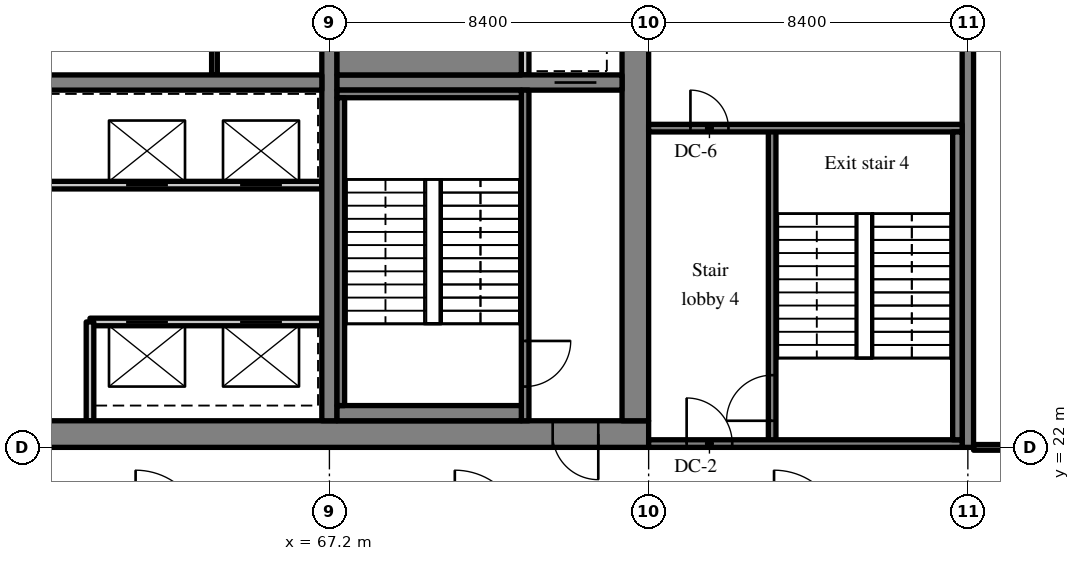
"""IFC4 building model, lengths in metres.
Left out: names, types, materials, properties, quantities, classifications, styles, units other than length and angle.
Written with IfcOpenShell. Run it as: python <this file> out.ifc"""

import sys

from ifc_helpers import new_model, si_unit, direction, frame, frame_2d, origin, place, context, subcontext, project, spatial, rectangle, extrude, source, transform, mapped, element, fill, save


model = new_model("IFC4")
c1 = context("Model", 3, precision=1e-05, world=origin(), true_north=direction((0.0, 1.0)))
c2 = subcontext(c1, "Body", "Model", "MODEL_VIEW")
j1 = project(units=[si_unit("LENGTHUNIT", "METRE"), si_unit("PLANEANGLEUNIT", "RADIAN")], contexts=[c1])
p1 = place(None, origin())
s1 = spatial("IfcSite", under=j1, at=p1, CompositionType="ELEMENT")
p2 = place(p1, origin())
s2 = spatial("IfcBuilding", under=s1, at=p2, CompositionType="ELEMENT")
p3 = place(p2, frame((0.0, 0.0, 146.2)))
s3 = spatial("IfcBuildingStorey", under=s2, at=p3, CompositionType="ELEMENT", Elevation=146.2)
m1 = source(origin(), c2, "Body", "SweptSolid", [
    extrude(rectangle(XDim=50.4, YDim=0.7, at=frame_2d((25.2, 0.0))), origin(), (0.0, 0.0, 1.0), 5.12),
])
p4 = place(p3, frame((25.2, 22.35, 0.0), z_axis=(0.0, 0.0, 1.0), x_axis=(1.0, 0.0, 0.0)))
e1 = element("IfcWall", 1, at=p4, inside=s3, PredefinedType="SHEAR", context=c2, shape_type="MappedRepresentation", body=[
    mapped(m1, transform((0.0, 0.0, 0.0), scale=1.0)),
])
m2 = source(origin(), c2, "Body", "SweptSolid", [
    extrude(rectangle(XDim=1.8, YDim=2.1, at=frame_2d((0.9, 1.05))), frame((0.0, 0.36, 0.0), z_axis=(0.0, -1.0, 0.0), x_axis=(1.0, 0.0, 0.0)), (0.0, 0.0, 1.0), 0.72),
])
p5 = place(p4, frame((15.9, 0.0, 0.0)))
e2 = element("IfcOpeningElement", 2, at=p5, cuts=e1, PredefinedType="OPENING", context=c2, shape_type="MappedRepresentation", body=[
    mapped(m2, transform((0.0, 0.0, 0.0), scale=1.0)),
])
p6 = place(p4, frame((32.7, 0.0, 0.0)))
e3 = element("IfcOpeningElement", 3, at=p6, cuts=e1, PredefinedType="OPENING", context=c2, shape_type="MappedRepresentation", body=[
    mapped(m2, transform((0.0, 0.0, 0.0), scale=1.0)),
])
m3 = source(origin(), c2, "Body", "SweptSolid", [
    extrude(rectangle(XDim=1.2, YDim=2.1, at=frame_2d((0.6, 1.05))), frame((0.0, 0.36, 0.0), z_axis=(0.0, -1.0, 0.0), x_axis=(1.0, 0.0, 0.0)), (0.0, 0.0, 1.0), 0.72),
])
p7 = place(p4, frame((6.475, 0.0, 0.0)))
e4 = element("IfcOpeningElement", 4, at=p7, cuts=e1, PredefinedType="OPENING", context=c2, shape_type="MappedRepresentation", body=[
    mapped(m3, transform((0.0, 0.0, 0.0), scale=1.0)),
])
p8 = place(p4, frame((47.875, 0.0, 0.0)))
e5 = element("IfcOpeningElement", 5, at=p8, cuts=e1, PredefinedType="OPENING", context=c2, shape_type="MappedRepresentation", body=[
    mapped(m3, transform((0.0, 0.0, 0.0), scale=1.0)),
])
m4 = source(origin(), c2, "Body", "SweptSolid", [
    extrude(rectangle(XDim=18.6, YDim=0.7, at=frame_2d((9.3, 0.0))), origin(), (0.0, 0.0, 1.0), 5.12),
])
p9 = place(p3, frame((75.25, 22.7, 0.0), z_axis=(0.0, 0.0, 1.0), x_axis=(0.0, 1.0, 0.0)))
e6 = element("IfcWall", 6, at=p9, inside=s3, PredefinedType="SHEAR", context=c2, shape_type="MappedRepresentation", body=[
    mapped(m4, transform((0.0, 0.0, 0.0), scale=1.0)),
])
p10 = place(p9, frame((12.7, 0.0, 0.0)))
e7 = element("IfcOpeningElement", 7, at=p10, cuts=e6, PredefinedType="OPENING", context=c2, shape_type="MappedRepresentation", body=[
    mapped(m3, transform((0.0, 0.0, 0.0), scale=1.0)),
])
m5 = source(origin(), c2, "Body", "SweptSolid", [
    extrude(rectangle(XDim=18.6, YDim=0.4, at=frame_2d((9.3, 0.0))), origin(), (0.0, 0.0, 1.0), 5.12),
])
p11 = place(p3, frame((67.2, 22.7, 0.0), z_axis=(0.0, 0.0, 1.0), x_axis=(0.0, 1.0, 0.0)))
e8 = element("IfcWall", 8, at=p11, inside=s3, PredefinedType="SHEAR", context=c2, shape_type="MappedRepresentation", body=[
    mapped(m5, transform((0.0, 0.0, 0.0), scale=1.0)),
])
m6 = source(origin(), c2, "Body", "SweptSolid", [
    extrude(rectangle(XDim=16.4, YDim=0.4, at=frame_2d((8.2, 0.0))), origin(), (0.0, 0.0, 1.0), 5.12),
])
p12 = place(p3, frame((50.6, 31.6, 0.0), z_axis=(0.0, 0.0, 1.0), x_axis=(1.0, 0.0, 0.0)))
e9 = element("IfcWall", 9, at=p12, inside=s3, PredefinedType="SHEAR", context=c2, shape_type="MappedRepresentation", body=[
    mapped(m6, transform((0.0, 0.0, 0.0), scale=1.0)),
])
m7 = source(origin(), c2, "Body", "SweptSolid", [
    extrude(rectangle(XDim=1.0, YDim=2.1, at=frame_2d((0.5, 1.05))), frame((0.0, 0.21, 0.0), z_axis=(0.0, -1.0, 0.0), x_axis=(1.0, 0.0, 0.0)), (0.0, 0.0, 1.0), 0.42),
])
p13 = place(p12, frame((0.6, 0.0, 0.0)))
e10 = element("IfcOpeningElement", 10, at=p13, cuts=e9, PredefinedType="OPENING", context=c2, shape_type="MappedRepresentation", body=[
    mapped(m7, transform((0.0, 0.0, 0.0), scale=1.0)),
])
m8 = source(origin(), c2, "Body", "SweptSolid", [
    extrude(rectangle(XDim=7.5, YDim=0.4, at=frame_2d((3.75, 0.0))), origin(), (0.0, 0.0, 1.0), 5.12),
])
p14 = place(p3, frame((67.4, 31.6, 0.0), z_axis=(0.0, 0.0, 1.0), x_axis=(1.0, 0.0, 0.0)))
e11 = element("IfcWall", 11, at=p14, inside=s3, PredefinedType="SHEAR", context=c2, shape_type="MappedRepresentation", body=[
    mapped(m8, transform((0.0, 0.0, 0.0), scale=1.0)),
])
m9 = source(origin(), c2, "Body", "SweptSolid", [
    extrude(rectangle(XDim=1.1, YDim=2.1, at=frame_2d((0.55, 1.05))), frame((0.0, 0.21, 0.0), z_axis=(0.0, -1.0, 0.0), x_axis=(1.0, 0.0, 0.0)), (0.0, 0.0, 1.0), 0.42),
])
p15 = place(p14, frame((5.725, 0.0, 0.0)))
e12 = element("IfcOpeningElement", 12, at=p15, cuts=e11, PredefinedType="OPENING", context=c2, shape_type="MappedRepresentation", body=[
    mapped(m9, transform((0.0, 0.0, 0.0), scale=1.0)),
])
m10 = source(origin(), c2, "Body", "SweptSolid", [
    extrude(rectangle(XDim=20.0, YDim=0.3, at=frame_2d((10.0, 0.0))), origin(), (0.0, 0.0, 1.0), 5.12),
])
p16 = place(p3, frame((84.0, 22.0, 0.0), z_axis=(0.0, 0.0, 1.0), x_axis=(0.0, 1.0, 0.0)))
e13 = element("IfcWall", 13, at=p16, inside=s3, PredefinedType="SHEAR", context=c2, shape_type="MappedRepresentation", body=[
    mapped(m10, transform((0.0, 0.0, 0.0), scale=1.0)),
])
m11 = source(origin(), c2, "Body", "SweptSolid", [
    extrude(rectangle(XDim=6.1, YDim=0.2, at=frame_2d((3.05, 0.0))), origin(), (0.0, 0.0, 1.0), 5.12),
])
p17 = place(p3, frame((67.0, 25.3, 0.0), z_axis=(0.0, 0.0, 1.0), x_axis=(-1.0, 0.0, 0.0)))
e14 = element("IfcWall", 14, at=p17, inside=s3, PredefinedType="SOLIDWALL", context=c2, shape_type="MappedRepresentation", body=[
    mapped(m11, transform((0.0, 0.0, 0.0), scale=1.0)),
])
m12 = source(origin(), c2, "Body", "SweptSolid", [
    extrude(rectangle(XDim=1.1, YDim=2.1, at=frame_2d((0.55, 1.05))), frame((0.0, 0.11, 0.0), z_axis=(0.0, -1.0, 0.0), x_axis=(1.0, 0.0, 0.0)), (0.0, 0.0, 1.0), 0.22),
])
p18 = place(p17, frame((1.05, 0.0, 0.0)))
e15 = element("IfcOpeningElement", 15, at=p18, cuts=e14, PredefinedType="OPENING", context=c2, shape_type="MappedRepresentation", body=[
    mapped(m12, transform((0.0, 0.0, 0.0), scale=1.0)),
])
p19 = place(p17, frame((4.05, 0.0, 0.0)))
e16 = element("IfcOpeningElement", 16, at=p19, cuts=e14, PredefinedType="OPENING", context=c2, shape_type="MappedRepresentation", body=[
    mapped(m12, transform((0.0, 0.0, 0.0), scale=1.0)),
])
m13 = source(origin(), c2, "Body", "SweptSolid", [
    extrude(rectangle(XDim=12.1, YDim=0.2, at=frame_2d((6.05, 0.0))), origin(), (0.0, 0.0, 1.0), 5.12),
])
p20 = place(p3, frame((67.0, 28.9, 0.0), z_axis=(0.0, 0.0, 1.0), x_axis=(-1.0, 0.0, 0.0)))
e17 = element("IfcWall", 17, at=p20, inside=s3, PredefinedType="SOLIDWALL", context=c2, shape_type="MappedRepresentation", body=[
    mapped(m13, transform((0.0, 0.0, 0.0), scale=1.0)),
])
p21 = place(p20, frame((1.05, 0.0, 0.0)))
e18 = element("IfcOpeningElement", 18, at=p21, cuts=e17, PredefinedType="OPENING", context=c2, shape_type="MappedRepresentation", body=[
    mapped(m12, transform((0.0, 0.0, 0.0), scale=1.0)),
])
p22 = place(p20, frame((4.05, 0.0, 0.0)))
e19 = element("IfcOpeningElement", 19, at=p22, cuts=e17, PredefinedType="OPENING", context=c2, shape_type="MappedRepresentation", body=[
    mapped(m12, transform((0.0, 0.0, 0.0), scale=1.0)),
])
m14 = source(origin(), c2, "Body", "SweptSolid", [
    extrude(rectangle(XDim=2.6, YDim=0.2, at=frame_2d((1.3, 0.0))), origin(), (0.0, 0.0, 1.0), 5.12),
])
p23 = place(p3, frame((60.9, 22.7, 0.0), z_axis=(0.0, 0.0, 1.0), x_axis=(0.0, 1.0, 0.0)))
e20 = element("IfcWall", 20, at=p23, inside=s3, PredefinedType="SOLIDWALL", context=c2, shape_type="MappedRepresentation", body=[
    mapped(m14, transform((0.0, 0.0, 0.0), scale=1.0)),
])
m15 = source(origin(), c2, "Body", "SweptSolid", [
    extrude(rectangle(XDim=3.2, YDim=0.15, at=frame_2d((1.6, 0.0))), origin(), (0.0, 0.0, 1.0), 5.12),
])
p24 = place(p3, frame((64.175, 31.8, 0.0), z_axis=(0.0, 0.0, 1.0), x_axis=(0.0, 1.0, 0.0)))
e21 = element("IfcWall", 21, at=p24, inside=s3, PredefinedType="PARTITIONING", context=c2, shape_type="MappedRepresentation", body=[
    mapped(m15, transform((0.0, 0.0, 0.0), scale=1.0)),
])
m16 = source(origin(), c2, "Body", "SweptSolid", [
    extrude(rectangle(XDim=8.7, YDim=0.2, at=frame_2d((4.35, 0.0))), origin(), (0.0, 0.0, 1.0), 5.12),
])
p25 = place(p3, frame((72.35, 22.7, 0.0), z_axis=(0.0, 0.0, 1.0), x_axis=(0.0, 1.0, 0.0)))
e22 = element("IfcWall", 22, at=p25, inside=s3, PredefinedType="SOLIDWALL", context=c2, shape_type="MappedRepresentation", body=[
    mapped(m16, transform((0.0, 0.0, 0.0), scale=1.0)),
])
m17 = source(origin(), c2, "Body", "SweptSolid", [
    extrude(rectangle(XDim=1.2, YDim=2.1, at=frame_2d((0.6, 1.05))), frame((0.0, 0.11, 0.0), z_axis=(0.0, -1.0, 0.0), x_axis=(1.0, 0.0, 0.0)), (0.0, 0.0, 1.0), 0.22),
])
p26 = place(p25, frame((0.9, 0.0, 0.0)))
e23 = element("IfcOpeningElement", 23, at=p26, cuts=e22, PredefinedType="OPENING", context=c2, shape_type="MappedRepresentation", body=[
    mapped(m17, transform((0.0, 0.0, 0.0), scale=1.0)),
])
m18 = source(origin(), c2, "Body", "SweptSolid", [
    extrude(rectangle(XDim=1.8, YDim=0.2, at=frame_2d((0.9, 0.0))), origin(), (0.0, 0.0, 1.0), 5.12),
])
p27 = place(p3, frame((72.35, 31.8, 0.0), z_axis=(0.0, 0.0, 1.0), x_axis=(0.0, 1.0, 0.0)))
e24 = element("IfcWall", 24, at=p27, inside=s3, PredefinedType="SOLIDWALL", context=c2, shape_type="MappedRepresentation", body=[
    mapped(m18, transform((0.0, 0.0, 0.0), scale=1.0)),
])
m19 = source(origin(), c2, "Body", "SweptSolid", [
    extrude(rectangle(XDim=8.3, YDim=0.2, at=frame_2d((4.15, 0.0))), origin(), (0.0, 0.0, 1.0), 5.12),
])
p28 = place(p3, frame((78.85, 22.1, 0.0), z_axis=(0.0, 0.0, 1.0), x_axis=(0.0, 1.0, 0.0)))
e25 = element("IfcWall", 25, at=p28, inside=s3, PredefinedType="SOLIDWALL", context=c2, shape_type="MappedRepresentation", body=[
    mapped(m19, transform((0.0, 0.0, 0.0), scale=1.0)),
])
p29 = place(p28, frame((0.6, 0.0, 0.0)))
e26 = element("IfcOpeningElement", 26, at=p29, cuts=e25, PredefinedType="OPENING", context=c2, shape_type="MappedRepresentation", body=[
    mapped(m17, transform((0.0, 0.0, 0.0), scale=1.0)),
])
m20 = source(origin(), c2, "Body", "SweptSolid", [
    extrude(rectangle(XDim=8.25, YDim=0.2, at=frame_2d((4.125, 0.0))), origin(), (0.0, 0.0, 1.0), 5.12),
])
p30 = place(p3, frame((83.85, 22.1, 0.0), z_axis=(0.0, 0.0, 1.0), x_axis=(-1.0, 0.0, 0.0)))
e27 = element("IfcWall", 27, at=p30, inside=s3, PredefinedType="SOLIDWALL", context=c2, shape_type="MappedRepresentation", body=[
    mapped(m20, transform((0.0, 0.0, 0.0), scale=1.0)),
])
p31 = place(p30, frame((6.05, 0.0, 0.0)))
e28 = element("IfcOpeningElement", 28, at=p31, cuts=e27, PredefinedType="OPENING", context=c2, shape_type="MappedRepresentation", body=[
    mapped(m17, transform((0.0, 0.0, 0.0), scale=1.0)),
])
p32 = place(p3, frame((83.85, 30.4, 0.0), z_axis=(0.0, 0.0, 1.0), x_axis=(-1.0, 0.0, 0.0)))
e29 = element("IfcWall", 29, at=p32, inside=s3, PredefinedType="SOLIDWALL", context=c2, shape_type="MappedRepresentation", body=[
    mapped(m20, transform((0.0, 0.0, 0.0), scale=1.0)),
])
m21 = source(origin(), c2, "Body", "SweptSolid", [
    extrude(rectangle(XDim=1.0, YDim=2.1, at=frame_2d((0.5, 1.05))), frame((0.0, 0.11, 0.0), z_axis=(0.0, -1.0, 0.0), x_axis=(1.0, 0.0, 0.0)), (0.0, 0.0, 1.0), 0.22),
])
p33 = place(p32, frame((6.15, 0.0, 0.0)))
e30 = element("IfcOpeningElement", 30, at=p33, cuts=e29, PredefinedType="OPENING", context=c2, shape_type="MappedRepresentation", body=[
    mapped(m21, transform((0.0, 0.0, 0.0), scale=1.0)),
])
m22 = source(origin(), c2, "Body", "SweptSolid", [
    extrude(rectangle(XDim=4.85, YDim=0.4, at=frame_2d((2.425, 0.0))), origin(), (0.0, 0.0, 1.0), 5.12),
])
p34 = place(p3, frame((67.4, 22.9, 0.0), z_axis=(0.0, 0.0, 1.0), x_axis=(1.0, 0.0, 0.0)))
e31 = element("IfcWall", 31, at=p34, inside=s3, PredefinedType="SOLIDWALL", context=c2, shape_type="MappedRepresentation", body=[
    mapped(m22, transform((0.0, 0.0, 0.0), scale=1.0)),
])
m23 = source(origin(), c2, "Body", "SweptSolid", [
    extrude(rectangle(XDim=4.85, YDim=0.2, at=frame_2d((2.425, 0.0))), origin(), (0.0, 0.0, 1.0), 5.12),
])
p35 = place(p3, frame((67.4, 31.3, 0.0), z_axis=(0.0, 0.0, 1.0), x_axis=(1.0, 0.0, 0.0)))
e32 = element("IfcWall", 32, at=p35, inside=s3, PredefinedType="SOLIDWALL", context=c2, shape_type="MappedRepresentation", body=[
    mapped(m23, transform((0.0, 0.0, 0.0), scale=1.0)),
])
m24 = source(origin(), c2, "Body", "SweptSolid", [
    extrude(rectangle(XDim=8.1, YDim=0.2, at=frame_2d((4.05, 0.0))), origin(), (0.0, 0.0, 1.0), 5.12),
])
p36 = place(p3, frame((67.5, 23.1, 0.0), z_axis=(0.0, 0.0, 1.0), x_axis=(0.0, 1.0, 0.0)))
e33 = element("IfcWall", 33, at=p36, inside=s3, PredefinedType="SOLIDWALL", context=c2, shape_type="MappedRepresentation", body=[
    mapped(m24, transform((0.0, 0.0, 0.0), scale=1.0)),
])
m25 = source(origin(), c2, "Body", "SweptSolid", [
    extrude(rectangle(XDim=4.85, YDim=1.0, at=frame_2d((2.425, 0.0))), origin(), (0.0, 0.0, 1.0), 5.12),
])
p37 = place(p3, frame((67.4, 32.3, 0.0), z_axis=(0.0, 0.0, 1.0), x_axis=(1.0, 0.0, 0.0)))
e34 = element("IfcWall", 34, at=p37, inside=s3, PredefinedType="SOLIDWALL", context=c2, shape_type="MappedRepresentation", body=[
    mapped(m25, transform((0.0, 0.0, 0.0), scale=1.0)),
])
m26 = source(origin(), c2, "Body", "SweptSolid", [
    extrude(rectangle(XDim=8.1, YDim=0.25, at=frame_2d((4.05, 0.0))), origin(), (0.0, 0.0, 1.0), 5.12),
])
p38 = place(p3, frame((83.725, 22.2, 0.0), z_axis=(0.0, 0.0, 1.0), x_axis=(0.0, 1.0, 0.0)))
e35 = element("IfcWall", 35, at=p38, inside=s3, PredefinedType="SOLIDWALL", context=c2, shape_type="MappedRepresentation", body=[
    mapped(m26, transform((0.0, 0.0, 0.0), scale=1.0)),
])
m27 = source(origin(), c2, "Body", "SweptSolid", [
    extrude(rectangle(XDim=7.95, YDim=0.15, at=frame_2d((3.975, 0.0))), origin(), (0.0, 0.0, 1.0), 4.42),
])
p39 = place(p3, frame((84.15, 22.0, 0.0), z_axis=(0.0, 0.0, 1.0), x_axis=(1.0, 0.0, 0.0)))
e36 = element("IfcWall", 36, at=p39, inside=s3, PredefinedType="PARTITIONING", context=c2, shape_type="MappedRepresentation", body=[
    mapped(m27, transform((0.0, 0.0, 0.0), scale=1.0)),
])
m28 = source(origin(), c2, "Body", "SweptSolid", [
    extrude(rectangle(XDim=1.8, YDim=2.1, at=frame_2d((0.9, 1.05))), frame((0.0, 0.085, 0.0), z_axis=(0.0, -1.0, 0.0), x_axis=(1.0, 0.0, 0.0)), (0.0, 0.0, 1.0), 0.17),
])
p40 = place(p39, frame((3.075, 0.0, 0.0)))
e37 = element("IfcOpeningElement", 37, at=p40, cuts=e36, PredefinedType="OPENING", context=c2, shape_type="MappedRepresentation", body=[
    mapped(m28, transform((0.0, 0.0, 0.0), scale=1.0)),
])
m29 = source(origin(), c2, "Body", "SweptSolid", [
    extrude(rectangle(XDim=1.1, YDim=2.1, at=frame_2d((0.55, 1.05))), frame((0.0, 0.025, 0.0), z_axis=(0.0, -1.0, 0.0), x_axis=(1.0, 0.0, 0.0)), (0.0, 0.0, 1.0), 0.05),
])
p41 = place(p18, origin())
e38 = element("IfcDoor", 38, at=p41, inside=s3, OperationType="SLIDING_TO_LEFT", PredefinedType="DOOR", context=c2, shape_type="MappedRepresentation", body=[
    mapped(m29, transform((0.0, 0.0, 0.0), scale=1.0)),
])
fill(e15, e38)
p42 = place(p19, origin())
e39 = element("IfcDoor", 39, at=p42, inside=s3, OperationType="SLIDING_TO_RIGHT", PredefinedType="DOOR", context=c2, shape_type="MappedRepresentation", body=[
    mapped(m29, transform((0.0, 0.0, 0.0), scale=1.0)),
])
fill(e16, e39)
p43 = place(p21, origin())
e40 = element("IfcDoor", 40, at=p43, inside=s3, OperationType="SLIDING_TO_LEFT", PredefinedType="DOOR", context=c2, shape_type="MappedRepresentation", body=[
    mapped(m29, transform((0.0, 0.0, 0.0), scale=1.0)),
])
fill(e18, e40)
p44 = place(p22, origin())
e41 = element("IfcDoor", 41, at=p44, inside=s3, OperationType="SLIDING_TO_RIGHT", PredefinedType="DOOR", context=c2, shape_type="MappedRepresentation", body=[
    mapped(m29, transform((0.0, 0.0, 0.0), scale=1.0)),
])
fill(e19, e41)
m30 = source(origin(), c2, "Body", "SweptSolid", [
    extrude(rectangle(XDim=1.2, YDim=2.1, at=frame_2d((0.6, 1.05))), frame((0.0, 0.025, 0.0), z_axis=(0.0, -1.0, 0.0), x_axis=(1.0, 0.0, 0.0)), (0.0, 0.0, 1.0), 0.05),
])
p45 = place(p26, origin())
e42 = element("IfcDoor", 42, at=p45, inside=s3, OperationType="SINGLE_SWING_RIGHT", PredefinedType="DOOR", context=c2, shape_type="MappedRepresentation", body=[
    mapped(m30, transform((0.0, 0.0, 0.0), scale=1.0)),
])
fill(e23, e42)
m31 = source(origin(), c2, "Body", "SweptSolid", [
    extrude(rectangle(XDim=1.2, YDim=2.1, at=frame_2d((0.6, 1.05))), frame((0.0, 0.275, 0.0), z_axis=(0.0, -1.0, 0.0), x_axis=(1.0, 0.0, 0.0)), (0.0, 0.0, 1.0), 0.05),
])
p46 = place(p8, origin())
e43 = element("IfcDoor", 43, at=p46, inside=s3, OperationType="SINGLE_SWING_RIGHT", PredefinedType="DOOR", context=c2, shape_type="MappedRepresentation", body=[
    mapped(m31, transform((0.0, 0.0, 0.0), scale=1.0)),
])
fill(e5, e43)
p47 = place(p15, origin())
e44 = element("IfcDoor", 44, at=p47, inside=s3, OperationType="SLIDING_TO_RIGHT", PredefinedType="DOOR", context=c2, shape_type="MappedRepresentation", body=[
    mapped(m29, transform((0.0, 0.0, 0.0), scale=1.0)),
])
fill(e12, e44)
p48 = place(p29, origin())
e45 = element("IfcDoor", 45, at=p48, inside=s3, OperationType="SINGLE_SWING_LEFT", PredefinedType="DOOR", context=c2, shape_type="MappedRepresentation", body=[
    mapped(m30, transform((0.0, 0.0, 0.0), scale=1.0)),
])
fill(e26, e45)
p49 = place(p31, origin())
e46 = element("IfcDoor", 46, at=p49, inside=s3, OperationType="SINGLE_SWING_RIGHT", PredefinedType="DOOR", context=c2, shape_type="MappedRepresentation", body=[
    mapped(m30, transform((0.0, 0.0, 0.0), scale=1.0)),
])
fill(e28, e46)
m32 = source(origin(), c2, "Body", "SweptSolid", [
    extrude(rectangle(XDim=1.0, YDim=2.1, at=frame_2d((0.5, 1.05))), frame((0.0, 0.025, 0.0), z_axis=(0.0, -1.0, 0.0), x_axis=(1.0, 0.0, 0.0)), (0.0, 0.0, 1.0), 0.05),
])
p50 = place(p33, origin())
e47 = element("IfcDoor", 47, at=p50, inside=s3, OperationType="SINGLE_SWING_RIGHT", PredefinedType="DOOR", context=c2, shape_type="MappedRepresentation", body=[
    mapped(m32, transform((0.0, 0.0, 0.0), scale=1.0)),
])
fill(e30, e47)
save(model, sys.argv[1])
